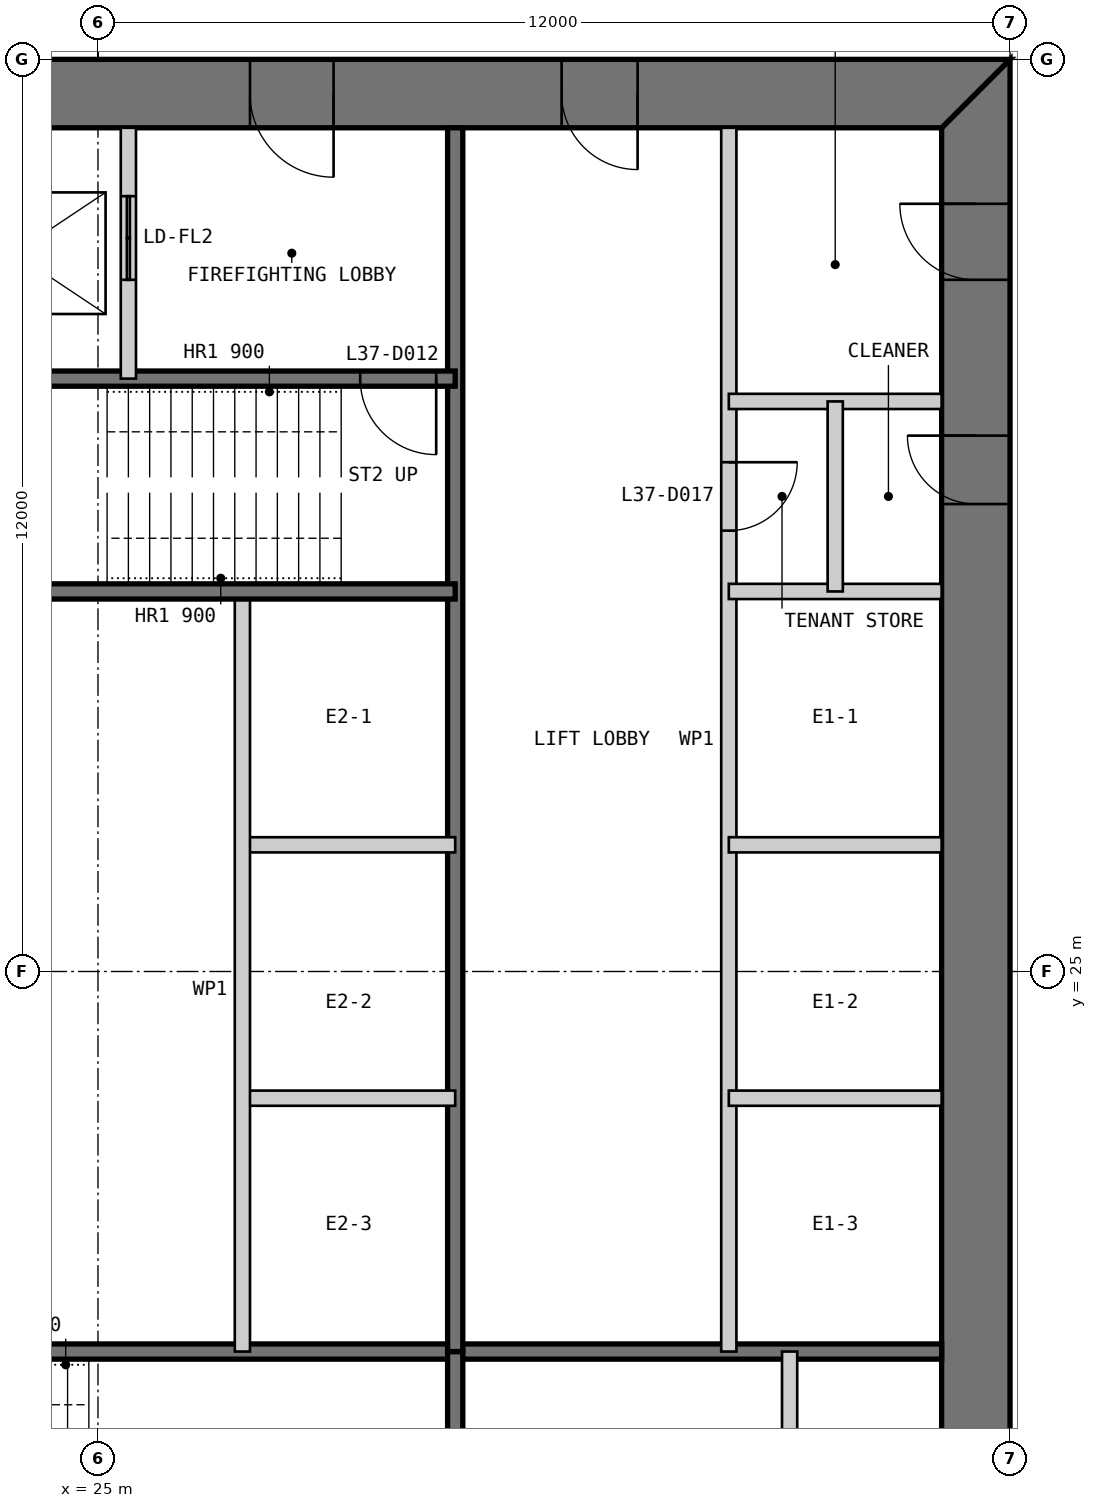
"""IFC4 building model, lengths in metres.
Left out: names, types, materials, properties, quantities, classifications, styles, units other than length and angle.
Written with IfcOpenShell. Run it as: python <this file> out.ifc"""

import sys

from ifc_helpers import new_model, si_unit, direction, frame, frame_2d, origin, place, context, subcontext, project, spatial, polyline, rectangle, outline, extrude, element, fill, save


model = new_model("IFC4")
c1 = context("Model", 3, precision=1e-05, world=origin(), true_north=direction((0.0, 1.0)))
c2 = subcontext(c1, "Body", "Model", "MODEL_VIEW")
j1 = project(units=[si_unit("LENGTHUNIT", "METRE"), si_unit("PLANEANGLEUNIT", "RADIAN")], contexts=[c1])
p1 = place(None, origin())
s1 = spatial("IfcSite", under=j1, at=p1, CompositionType="ELEMENT")
p2 = place(p1, origin())
s2 = spatial("IfcBuilding", under=s1, at=p2, CompositionType="ELEMENT")
p3 = place(p2, frame((0.0, 0.0, 158.4)))
s3 = spatial("IfcBuildingStorey", under=s2, at=p3, CompositionType="ELEMENT", Elevation=158.4)
p4 = place(p3, frame((36.55, 13.9, 0.0), z_axis=(0.0, 0.0, 1.0), x_axis=(0.0, 1.0, 0.0)))
e1 = element("IfcWall", 1, at=p4, inside=s3, PredefinedType="SHEAR", context=c2, shape_type="SweptSolid", body=[
    extrude(outline(polyline([(-0.9, -0.45), (23.1, -0.45), (22.2, 0.45), (0.0, 0.45), (-0.9, -0.45)])), origin(), (0.0, 0.0, 1.0), 4.0),
])
p5 = place(p4, frame((20.2, 0.0, 0.0)))
e2 = element("IfcOpeningElement", 2, at=p5, cuts=e1, PredefinedType="OPENING", context=c2, shape_type="SweptSolid", body=[
    extrude(rectangle(XDim=1.0, YDim=2.2, at=frame_2d((0.5, 1.1))), frame((0.0, 0.46, 0.0), z_axis=(0.0, -1.0, 0.0), x_axis=(1.0, 0.0, 0.0)), (0.0, 0.0, 1.0), 0.92),
])
p6 = place(p4, frame((17.25, 0.0, 0.0)))
e3 = element("IfcOpeningElement", 3, at=p6, cuts=e1, PredefinedType="OPENING", context=c2, shape_type="SweptSolid", body=[
    extrude(rectangle(XDim=0.9, YDim=2.2, at=frame_2d((0.45, 1.1))), frame((0.0, 0.46, 0.0), z_axis=(0.0, -1.0, 0.0), x_axis=(1.0, 0.0, 0.0)), (0.0, 0.0, 1.0), 0.92),
])
p7 = place(p3, frame((37.0, 36.55, 0.0), z_axis=(0.0, 0.0, 1.0), x_axis=(-1.0, 0.0, 0.0)))
e4 = element("IfcWall", 4, at=p7, inside=s3, PredefinedType="SHEAR", context=c2, shape_type="SweptSolid", body=[
    extrude(outline(polyline([(0.0, -0.45), (24.0, -0.45), (23.1, 0.45), (0.9, 0.45), (0.0, -0.45)])), origin(), (0.0, 0.0, 1.0), 4.0),
])
p8 = place(p7, frame((4.9, 0.0, 0.0)))
e5 = element("IfcOpeningElement", 5, at=p8, cuts=e4, PredefinedType="OPENING", context=c2, shape_type="SweptSolid", body=[
    extrude(rectangle(XDim=1.0, YDim=2.2, at=frame_2d((0.5, 1.1))), frame((0.0, 0.46, 0.0), z_axis=(0.0, -1.0, 0.0), x_axis=(1.0, 0.0, 0.0)), (0.0, 0.0, 1.0), 0.92),
])
p9 = place(p7, frame((8.9, 0.0, 0.0)))
e6 = element("IfcOpeningElement", 6, at=p9, cuts=e4, PredefinedType="OPENING", context=c2, shape_type="SweptSolid", body=[
    extrude(rectangle(XDim=1.1, YDim=2.2, at=frame_2d((0.55, 1.1))), frame((0.0, 0.46, 0.0), z_axis=(0.0, -1.0, 0.0), x_axis=(1.0, 0.0, 0.0)), (0.0, 0.0, 1.0), 0.92),
])
p10 = place(p7, frame((15.05, 0.0, 0.0)))
e7 = element("IfcOpeningElement", 7, at=p10, cuts=e4, PredefinedType="OPENING", context=c2, shape_type="SweptSolid", body=[
    extrude(rectangle(XDim=0.9, YDim=2.2, at=frame_2d((0.45, 1.1))), frame((0.0, 0.46, 0.0), z_axis=(0.0, -1.0, 0.0), x_axis=(1.0, 0.0, 0.0)), (0.0, 0.0, 1.0), 0.92),
])
p11 = place(p7, frame((17.9, 0.0, 0.0)))
e8 = element("IfcOpeningElement", 8, at=p11, cuts=e4, PredefinedType="OPENING", context=c2, shape_type="SweptSolid", body=[
    extrude(rectangle(XDim=1.0, YDim=2.2, at=frame_2d((0.5, 1.1))), frame((0.0, 0.46, 0.0), z_axis=(0.0, -1.0, 0.0), x_axis=(1.0, 0.0, 0.0)), (0.0, 0.0, 1.0), 0.92),
])
p12 = place(p7, frame((21.4, 0.0, 0.0)))
e9 = element("IfcOpeningElement", 9, at=p12, cuts=e4, PredefinedType="OPENING", context=c2, shape_type="SweptSolid", body=[
    extrude(rectangle(XDim=1.0, YDim=2.2, at=frame_2d((0.5, 1.1))), frame((0.0, 0.46, 0.0), z_axis=(0.0, -1.0, 0.0), x_axis=(1.0, 0.0, 0.0)), (0.0, 0.0, 1.0), 0.92),
])
p13 = place(p3, frame((20.3, 20.0, 0.0), z_axis=(0.0, 0.0, 1.0), x_axis=(1.0, 0.0, 0.0)))
e10 = element("IfcWall", 10, at=p13, inside=s3, PredefinedType="SOLIDWALL", context=c2, shape_type="SweptSolid", body=[
    extrude(rectangle(XDim=15.8, YDim=0.2, at=frame_2d((7.9, 0.0))), origin(), (0.0, 0.0, 1.0), 3.8),
])
p14 = place(p3, frame((29.7, 13.9, 0.0), z_axis=(0.0, 0.0, 1.0), x_axis=(0.0, 1.0, 0.0)))
e11 = element("IfcWall", 11, at=p14, inside=s3, PredefinedType="SOLIDWALL", context=c2, shape_type="SweptSolid", body=[
    extrude(rectangle(XDim=6.1, YDim=0.2, at=frame_2d((3.05, 0.0))), origin(), (0.0, 0.0, 1.0), 3.8),
])
p15 = place(p3, frame((34.1, 13.9, 0.0), z_axis=(0.0, 0.0, 1.0), x_axis=(0.0, 1.0, 0.0)))
e12 = element("IfcWall", 12, at=p15, inside=s3, PredefinedType="PARTITIONING", context=c2, shape_type="SweptSolid", body=[
    extrude(rectangle(XDim=6.1, YDim=0.2, at=frame_2d((3.05, 0.0))), origin(), (0.0, 0.0, 1.0), 3.8),
])
p16 = place(p3, frame((33.3, 36.1, 0.0), z_axis=(0.0, 0.0, 1.0), x_axis=(0.0, -1.0, 0.0)))
e13 = element("IfcWall", 13, at=p16, inside=s3, PredefinedType="PARTITIONING", context=c2, shape_type="SweptSolid", body=[
    extrude(rectangle(XDim=16.1, YDim=0.2, at=frame_2d((8.05, 0.0))), origin(), (0.0, 0.0, 1.0), 3.8),
])
p17 = place(p16, frame((4.4, 0.0, 0.0)))
e14 = element("IfcOpeningElement", 14, at=p17, cuts=e13, PredefinedType="OPENING", context=c2, shape_type="SweptSolid", body=[
    extrude(rectangle(XDim=0.9, YDim=2.2, at=frame_2d((0.45, 1.1))), frame((0.0, 0.11, 0.0), z_axis=(0.0, -1.0, 0.0), x_axis=(1.0, 0.0, 0.0)), (0.0, 0.0, 1.0), 0.22),
])
p18 = place(p3, frame((29.7, 36.1, 0.0), z_axis=(0.0, 0.0, 1.0), x_axis=(0.0, -1.0, 0.0)))
e15 = element("IfcWall", 15, at=p18, inside=s3, PredefinedType="SOLIDWALL", context=c2, shape_type="SweptSolid", body=[
    extrude(rectangle(XDim=16.1, YDim=0.2, at=frame_2d((8.05, 0.0))), origin(), (0.0, 0.0, 1.0), 3.8),
])
for number, where, z_axis, x_axis in (
    (16, (36.1, 30.0, 0.0), (0.0, 0.0, 1.0), (-1.0, 0.0, 0.0)),
    (17, (36.1, 26.667, 0.0), (0.0, 0.0, 1.0), (-1.0, 0.0, 0.0)),
    (18, (36.1, 23.333, 0.0), (0.0, 0.0, 1.0), (-1.0, 0.0, 0.0)),
    (19, (29.7, 26.667, 0.0), (0.0, 0.0, 1.0), (-1.0, 0.0, 0.0)),
    (20, (29.7, 23.333, 0.0), (0.0, 0.0, 1.0), (-1.0, 0.0, 0.0)),
):
    element("IfcWall", number, at=place(p3, frame(where, z_axis=z_axis, x_axis=x_axis)), inside=s3, PredefinedType="PARTITIONING", context=c2, shape_type="SweptSolid", body=[
        extrude(rectangle(XDim=2.8, YDim=0.2, at=frame_2d((1.4, 0.0))), origin(), (0.0, 0.0, 1.0), 3.8),
    ])
p19 = place(p3, frame((26.9, 30.0, 0.0), z_axis=(0.0, 0.0, 1.0), x_axis=(0.0, -1.0, 0.0)))
e21 = element("IfcWall", 21, at=p19, inside=s3, PredefinedType="PARTITIONING", context=c2, shape_type="SweptSolid", body=[
    extrude(rectangle(XDim=10.0, YDim=0.2, at=frame_2d((5.0, 0.0))), origin(), (0.0, 0.0, 1.0), 3.8),
])
p20 = place(p3, frame((29.7, 32.8, 0.0), z_axis=(0.0, 0.0, 1.0), x_axis=(-1.0, 0.0, 0.0)))
e22 = element("IfcWall", 22, at=p20, inside=s3, PredefinedType="SOLIDWALL", context=c2, shape_type="SweptSolid", body=[
    extrude(rectangle(XDim=9.4, YDim=0.2, at=frame_2d((4.7, 0.0))), origin(), (0.0, 0.0, 1.0), 3.8),
])
p21 = place(p20, frame((0.25, 0.0, 0.0)))
e23 = element("IfcOpeningElement", 23, at=p21, cuts=e22, PredefinedType="OPENING", context=c2, shape_type="SweptSolid", body=[
    extrude(rectangle(XDim=1.0, YDim=2.2, at=frame_2d((0.5, 1.1))), frame((0.0, 0.11, 0.0), z_axis=(0.0, -1.0, 0.0), x_axis=(1.0, 0.0, 0.0)), (0.0, 0.0, 1.0), 0.22),
])
p22 = place(p3, frame((29.7, 30.0, 0.0), z_axis=(0.0, 0.0, 1.0), x_axis=(-1.0, 0.0, 0.0)))
e24 = element("IfcWall", 24, at=p22, inside=s3, PredefinedType="SOLIDWALL", context=c2, shape_type="SweptSolid", body=[
    extrude(rectangle(XDim=15.8, YDim=0.2, at=frame_2d((7.9, 0.0))), origin(), (0.0, 0.0, 1.0), 3.8),
])
p23 = place(p3, frame((25.4, 36.1, 0.0), z_axis=(0.0, 0.0, 1.0), x_axis=(0.0, -1.0, 0.0)))
e25 = element("IfcWall", 25, at=p23, inside=s3, PredefinedType="PARTITIONING", context=c2, shape_type="SweptSolid", body=[
    extrude(rectangle(XDim=3.3, YDim=0.2, at=frame_2d((1.65, 0.0))), origin(), (0.0, 0.0, 1.0), 3.8),
])
p24 = place(p23, frame((0.9, 0.0, 0.0)))
e26 = element("IfcOpeningElement", 26, at=p24, cuts=e25, PredefinedType="OPENING", context=c2, shape_type="SweptSolid", body=[
    extrude(rectangle(XDim=1.1, YDim=2.2, at=frame_2d((0.55, 1.1))), frame((0.0, 0.11, 0.0), z_axis=(0.0, -1.0, 0.0), x_axis=(1.0, 0.0, 0.0)), (0.0, 0.0, 1.0), 0.22),
])
p25 = place(p3, frame((36.1, 32.5, 0.0), z_axis=(0.0, 0.0, 1.0), x_axis=(-1.0, 0.0, 0.0)))
e27 = element("IfcWall", 27, at=p25, inside=s3, PredefinedType="PARTITIONING", context=c2, shape_type="SweptSolid", body=[
    extrude(rectangle(XDim=2.8, YDim=0.2, at=frame_2d((1.4, 0.0))), origin(), (0.0, 0.0, 1.0), 3.8),
])
p26 = place(p3, frame((34.7, 32.5, 0.0), z_axis=(0.0, 0.0, 1.0), x_axis=(0.0, -1.0, 0.0)))
e28 = element("IfcWall", 28, at=p26, inside=s3, PredefinedType="PARTITIONING", context=c2, shape_type="SweptSolid", body=[
    extrude(rectangle(XDim=2.5, YDim=0.2, at=frame_2d((1.25, 0.0))), origin(), (0.0, 0.0, 1.0), 3.8),
])
p27 = place(p8, origin())
e29 = element("IfcDoor", 29, at=p27, inside=s3, OperationType="SINGLE_SWING_LEFT", PredefinedType="DOOR", context=c2, shape_type="SweptSolid", body=[
    extrude(rectangle(XDim=1.0, YDim=2.2, at=frame_2d((0.5, 1.1))), frame((0.0, 0.025, 0.0), z_axis=(0.0, -1.0, 0.0), x_axis=(1.0, 0.0, 0.0)), (0.0, 0.0, 1.0), 0.05),
    extrude(outline(polyline([(0.0, 0.0), (0.04, 0.0), (0.04, 2.16), (0.96, 2.16), (0.96, 0.0), (1.0, 0.0), (1.0, 2.2), (0.0, 2.2), (0.0, 0.0)])), frame((0.0, 0.3, 0.0), z_axis=(0.0, -1.0, 0.0), x_axis=(1.0, 0.0, 0.0)), (0.0, 0.0, 1.0), 0.6),
])
fill(e5, e29)
p28 = place(p9, origin())
e30 = element("IfcDoor", 30, at=p28, inside=s3, OperationType="SINGLE_SWING_LEFT", PredefinedType="DOOR", context=c2, shape_type="SweptSolid", body=[
    extrude(rectangle(XDim=1.1, YDim=2.2, at=frame_2d((0.55, 1.1))), frame((0.0, 0.025, 0.0), z_axis=(0.0, -1.0, 0.0), x_axis=(1.0, 0.0, 0.0)), (0.0, 0.0, 1.0), 0.05),
    extrude(outline(polyline([(0.0, 0.0), (0.04, 0.0), (0.04, 2.16), (1.06, 2.16), (1.06, 0.0), (1.1, 0.0), (1.1, 2.2), (0.0, 2.2), (0.0, 0.0)])), frame((0.0, 0.3, 0.0), z_axis=(0.0, -1.0, 0.0), x_axis=(1.0, 0.0, 0.0)), (0.0, 0.0, 1.0), 0.6),
])
fill(e6, e30)
p29 = place(p21, origin())
e31 = element("IfcDoor", 31, at=p29, inside=s3, OperationType="SINGLE_SWING_LEFT", PredefinedType="DOOR", context=c2, shape_type="SweptSolid", body=[
    extrude(rectangle(XDim=1.0, YDim=2.2, at=frame_2d((0.5, 1.1))), frame((0.0, 0.025, 0.0), z_axis=(0.0, -1.0, 0.0), x_axis=(1.0, 0.0, 0.0)), (0.0, 0.0, 1.0), 0.05),
])
fill(e23, e31)
p30 = place(p5, origin())
e32 = element("IfcDoor", 32, at=p30, inside=s3, OperationType="SINGLE_SWING_RIGHT", PredefinedType="DOOR", context=c2, shape_type="SweptSolid", body=[
    extrude(rectangle(XDim=1.0, YDim=2.2, at=frame_2d((0.5, 1.1))), frame((0.0, 0.025, 0.0), z_axis=(0.0, -1.0, 0.0), x_axis=(1.0, 0.0, 0.0)), (0.0, 0.0, 1.0), 0.05),
    extrude(outline(polyline([(0.0, 0.0), (0.04, 0.0), (0.04, 2.16), (0.96, 2.16), (0.96, 0.0), (1.0, 0.0), (1.0, 2.2), (0.0, 2.2), (0.0, 0.0)])), frame((0.0, 0.3, 0.0), z_axis=(0.0, -1.0, 0.0), x_axis=(1.0, 0.0, 0.0)), (0.0, 0.0, 1.0), 0.6),
])
fill(e2, e32)
p31 = place(p17, origin())
e33 = element("IfcDoor", 33, at=p31, inside=s3, OperationType="SINGLE_SWING_LEFT", PredefinedType="DOOR", context=c2, shape_type="SweptSolid", body=[
    extrude(rectangle(XDim=0.9, YDim=2.2, at=frame_2d((0.45, 1.1))), frame((0.0, 0.025, 0.0), z_axis=(0.0, -1.0, 0.0), x_axis=(1.0, 0.0, 0.0)), (0.0, 0.0, 1.0), 0.05),
])
fill(e14, e33)
p32 = place(p6, origin())
e34 = element("IfcDoor", 34, at=p32, inside=s3, OperationType="SINGLE_SWING_RIGHT", PredefinedType="DOOR", context=c2, shape_type="SweptSolid", body=[
    extrude(rectangle(XDim=0.9, YDim=2.2, at=frame_2d((0.45, 1.1))), frame((0.0, 0.025, 0.0), z_axis=(0.0, -1.0, 0.0), x_axis=(1.0, 0.0, 0.0)), (0.0, 0.0, 1.0), 0.05),
    extrude(outline(polyline([(0.0, 0.0), (0.04, 0.0), (0.04, 2.16), (0.86, 2.16), (0.86, 0.0), (0.9, 0.0), (0.9, 2.2), (0.0, 2.2), (0.0, 0.0)])), frame((0.0, 0.3, 0.0), z_axis=(0.0, -1.0, 0.0), x_axis=(1.0, 0.0, 0.0)), (0.0, 0.0, 1.0), 0.6),
])
fill(e3, e34)
p33 = place(p24, origin())
e35 = element("IfcDoor", 35, at=p33, inside=s3, OperationType="DOUBLE_DOOR_SLIDING", PredefinedType="DOOR", context=c2, shape_type="SweptSolid", body=[
    extrude(rectangle(XDim=1.1, YDim=2.2, at=frame_2d((0.55, 1.1))), frame((0.0, 0.025, 0.0), z_axis=(0.0, -1.0, 0.0), x_axis=(1.0, 0.0, 0.0)), (0.0, 0.0, 1.0), 0.05),
])
fill(e26, e35)
save(model, sys.argv[1])
